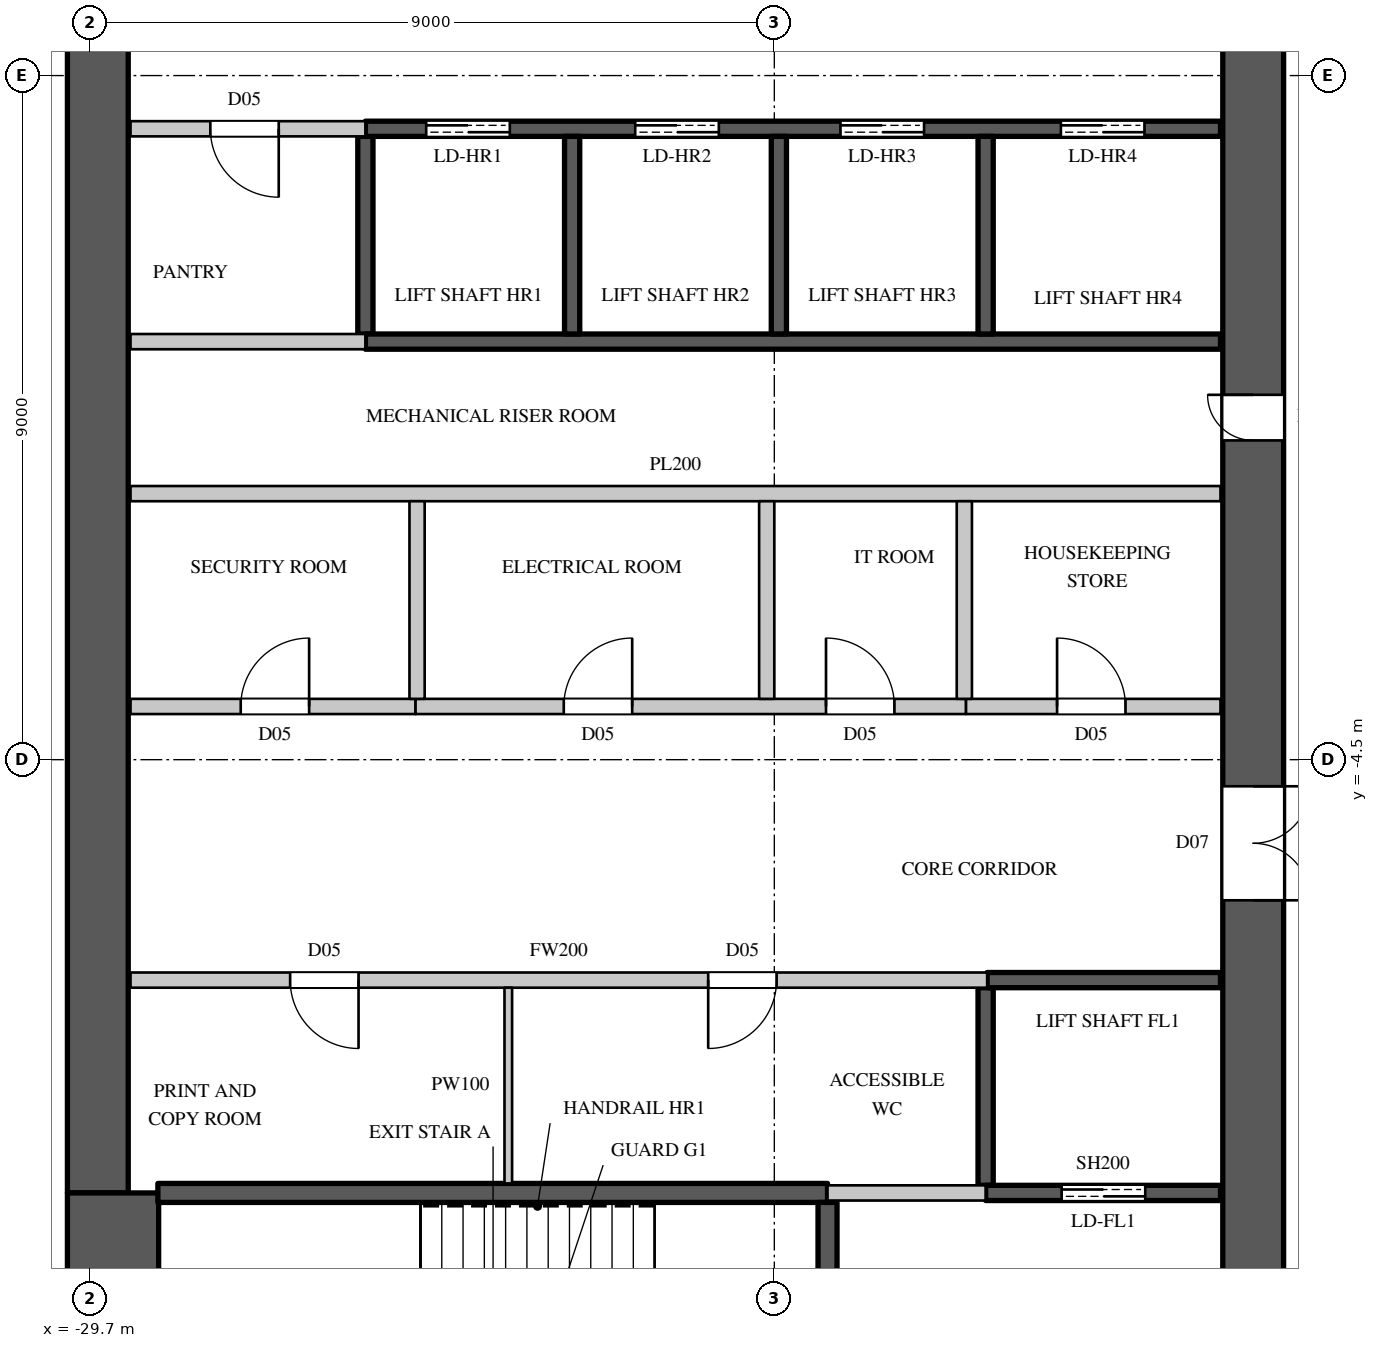
"""IFC4 building model, lengths in metres.
Left out: names, types, materials, properties, quantities, classifications, styles, units other than length and angle.
Written with IfcOpenShell. Run it as: python <this file> out.ifc"""

import sys

from ifc_helpers import new_model, si_unit, direction, frame, frame_2d, origin, place, context, subcontext, project, spatial, rectangle, extrude, element, fill, save


model = new_model("IFC4")
c1 = context("Model", 3, precision=1e-05, world=origin(), true_north=direction((0.0, 1.0)))
c2 = subcontext(c1, "Body", "Model", "MODEL_VIEW")
j1 = project(units=[si_unit("LENGTHUNIT", "METRE"), si_unit("PLANEANGLEUNIT", "RADIAN")], contexts=[c1])
p1 = place(None, origin())
s1 = spatial("IfcSite", under=j1, at=p1, CompositionType="ELEMENT")
p2 = place(p1, origin())
s2 = spatial("IfcBuilding", under=s1, at=p2, CompositionType="ELEMENT")
p3 = place(p2, frame((0.0, 0.0, 230.2)))
s3 = spatial("IfcBuildingStorey", under=s2, at=p3, CompositionType="ELEMENT", Elevation=230.2)
p4 = place(p3, frame((-14.4, -14.8, 0.0), z_axis=(0.0, 0.0, 1.0), x_axis=(0.0, 1.0, 0.0)))
e1 = element("IfcWall", 1, at=p4, inside=s3, PredefinedType="SHEAR", context=c2, shape_type="SweptSolid", body=[
    extrude(rectangle(XDim=29.6, YDim=0.8, at=frame_2d((14.8, 0.0))), origin(), (0.0, 0.0, 1.0), 4.1),
])
p5 = place(p4, frame((1.55, 0.0, 0.0)))
e2 = element("IfcOpeningElement", 2, at=p5, cuts=e1, PredefinedType="OPENING", context=c2, shape_type="SweptSolid", body=[
    extrude(rectangle(XDim=1.5, YDim=2.4, at=frame_2d((0.75, 1.2))), frame((0.0, 0.41, 0.0), z_axis=(0.0, -1.0, 0.0), x_axis=(1.0, 0.0, 0.0)), (0.0, 0.0, 1.0), 0.82),
])
p6 = place(p4, frame((26.55, 0.0, 0.0)))
e3 = element("IfcOpeningElement", 3, at=p6, cuts=e1, PredefinedType="OPENING", context=c2, shape_type="SweptSolid", body=[
    extrude(rectangle(XDim=1.5, YDim=2.4, at=frame_2d((0.75, 1.2))), frame((0.0, 0.41, 0.0), z_axis=(0.0, -1.0, 0.0), x_axis=(1.0, 0.0, 0.0)), (0.0, 0.0, 1.0), 0.82),
])
p7 = place(p4, frame((8.45, 0.0, 0.0)))
e4 = element("IfcOpeningElement", 4, at=p7, cuts=e1, PredefinedType="OPENING", context=c2, shape_type="SweptSolid", body=[
    extrude(rectangle(XDim=1.5, YDim=2.4, at=frame_2d((0.75, 1.2))), frame((0.0, 0.41, 0.0), z_axis=(0.0, -1.0, 0.0), x_axis=(1.0, 0.0, 0.0)), (0.0, 0.0, 1.0), 0.82),
])
p8 = place(p4, frame((19.65, 0.0, 0.0)))
e5 = element("IfcOpeningElement", 5, at=p8, cuts=e1, PredefinedType="OPENING", context=c2, shape_type="SweptSolid", body=[
    extrude(rectangle(XDim=1.5, YDim=2.4, at=frame_2d((0.75, 1.2))), frame((0.0, 0.41, 0.0), z_axis=(0.0, -1.0, 0.0), x_axis=(1.0, 0.0, 0.0)), (0.0, 0.0, 1.0), 0.82),
])
p9 = place(p4, frame((14.5, 0.0, 0.0)))
e6 = element("IfcOpeningElement", 6, at=p9, cuts=e1, PredefinedType="OPENING", context=c2, shape_type="SweptSolid", body=[
    extrude(rectangle(XDim=0.6, YDim=2.0, at=frame_2d((0.3, 1.0))), frame((0.0, 0.41, 0.0), z_axis=(0.0, -1.0, 0.0), x_axis=(1.0, 0.0, 0.0)), (0.0, 0.0, 1.0), 0.82),
])
p10 = place(p3, frame((-29.6, -10.2, 0.0), z_axis=(0.0, 0.0, 1.0), x_axis=(0.0, 1.0, 0.0)))
e7 = element("IfcWall", 7, at=p10, inside=s3, PredefinedType="SHEAR", context=c2, shape_type="SweptSolid", body=[
    extrude(rectangle(XDim=20.4, YDim=0.8, at=frame_2d((10.2, 0.0))), origin(), (0.0, 0.0, 1.0), 4.1),
])
p11 = place(p3, frame((-29.4, -14.8, 0.0), z_axis=(0.0, 0.0, 1.0), x_axis=(0.0, 1.0, 0.0)))
e8 = element("IfcWall", 8, at=p11, inside=s3, PredefinedType="SHEAR", context=c2, shape_type="SweptSolid", body=[
    extrude(rectangle(XDim=4.6, YDim=1.2, at=frame_2d((2.3, 0.0))), origin(), (0.0, 0.0, 1.0), 4.1),
])
p12 = place(p3, frame((-29.17, -7.4, 0.0), z_axis=(0.0, 0.0, 1.0), x_axis=(1.0, 0.0, 0.0)))
e9 = element("IfcWall", 9, at=p12, inside=s3, PredefinedType="PARTITIONING", context=c2, shape_type="SweptSolid", body=[
    extrude(rectangle(XDim=11.27, YDim=0.2, at=frame_2d((5.635, 0.0))), origin(), (0.0, 0.0, 1.0), 3.8),
])
p13 = place(p12, frame((2.1, 0.0, 0.0)))
e10 = element("IfcOpeningElement", 10, at=p13, cuts=e9, PredefinedType="OPENING", context=c2, shape_type="SweptSolid", body=[
    extrude(rectangle(XDim=0.9, YDim=2.2, at=frame_2d((0.45, 1.1))), frame((0.0, 0.11, 0.0), z_axis=(0.0, -1.0, 0.0), x_axis=(1.0, 0.0, 0.0)), (0.0, 0.0, 1.0), 0.22),
])
p14 = place(p12, frame((7.6, 0.0, 0.0)))
e11 = element("IfcOpeningElement", 11, at=p14, cuts=e9, PredefinedType="OPENING", context=c2, shape_type="SweptSolid", body=[
    extrude(rectangle(XDim=0.9, YDim=2.2, at=frame_2d((0.45, 1.1))), frame((0.0, 0.11, 0.0), z_axis=(0.0, -1.0, 0.0), x_axis=(1.0, 0.0, 0.0)), (0.0, 0.0, 1.0), 0.22),
])
p15 = place(p3, frame((-29.17, -3.8, 0.0), z_axis=(0.0, 0.0, 1.0), x_axis=(1.0, 0.0, 0.0)))
e12 = element("IfcWall", 12, at=p15, inside=s3, PredefinedType="PARTITIONING", context=c2, shape_type="SweptSolid", body=[
    extrude(rectangle(XDim=3.75, YDim=0.2, at=frame_2d((1.875, 0.0))), origin(), (0.0, 0.0, 1.0), 3.8),
])
p16 = place(p15, frame((1.45, 0.0, 0.0)))
e13 = element("IfcOpeningElement", 13, at=p16, cuts=e12, PredefinedType="OPENING", context=c2, shape_type="SweptSolid", body=[
    extrude(rectangle(XDim=0.9, YDim=2.2, at=frame_2d((0.45, 1.1))), frame((0.0, 0.11, 0.0), z_axis=(0.0, -1.0, 0.0), x_axis=(1.0, 0.0, 0.0)), (0.0, 0.0, 1.0), 0.22),
])
p17 = place(p3, frame((-29.17, 3.8, 0.0), z_axis=(0.0, 0.0, 1.0), x_axis=(1.0, 0.0, 0.0)))
e14 = element("IfcWall", 14, at=p17, inside=s3, PredefinedType="PARTITIONING", context=c2, shape_type="SweptSolid", body=[
    extrude(rectangle(XDim=3.09, YDim=0.2, at=frame_2d((1.545, 0.0))), origin(), (0.0, 0.0, 1.0), 3.8),
])
p18 = place(p17, frame((1.05, 0.0, 0.0)))
e15 = element("IfcOpeningElement", 15, at=p18, cuts=e14, PredefinedType="OPENING", context=c2, shape_type="SweptSolid", body=[
    extrude(rectangle(XDim=0.9, YDim=2.2, at=frame_2d((0.45, 1.1))), frame((0.0, 0.11, 0.0), z_axis=(0.0, -1.0, 0.0), x_axis=(1.0, 0.0, 0.0)), (0.0, 0.0, 1.0), 0.22),
])
p19 = place(p3, frame((-20.0, -10.2, 0.0), z_axis=(0.0, 0.0, 1.0), x_axis=(1.0, 0.0, 0.0)))
e16 = element("IfcWall", 16, at=p19, inside=s3, PredefinedType="PARTITIONING", context=c2, shape_type="SweptSolid", body=[
    extrude(rectangle(XDim=2.08, YDim=0.2, at=frame_2d((1.04, 0.0))), origin(), (0.0, 0.0, 1.0), 3.8),
])
p20 = place(p3, frame((-18.18, -3.8, 0.0), z_axis=(0.0, 0.0, 1.0), x_axis=(1.0, 0.0, 0.0)))
e17 = element("IfcWall", 17, at=p20, inside=s3, PredefinedType="PARTITIONING", context=c2, shape_type="SweptSolid", body=[
    extrude(rectangle(XDim=3.35, YDim=0.2, at=frame_2d((1.675, 0.0))), origin(), (0.0, 0.0, 1.0), 3.8),
])
p21 = place(p20, frame((1.2, 0.0, 0.0)))
e18 = element("IfcOpeningElement", 18, at=p21, cuts=e17, PredefinedType="OPENING", context=c2, shape_type="SweptSolid", body=[
    extrude(rectangle(XDim=0.9, YDim=2.2, at=frame_2d((0.45, 1.1))), frame((0.0, 0.11, 0.0), z_axis=(0.0, -1.0, 0.0), x_axis=(1.0, 0.0, 0.0)), (0.0, 0.0, 1.0), 0.22),
])
p22 = place(p3, frame((-29.17, -1.0, 0.0), z_axis=(0.0, 0.0, 1.0), x_axis=(1.0, 0.0, 0.0)))
e19 = element("IfcWall", 19, at=p22, inside=s3, PredefinedType="PARTITIONING", context=c2, shape_type="SweptSolid", body=[
    extrude(rectangle(XDim=14.34, YDim=0.2, at=frame_2d((7.17, 0.0))), origin(), (0.0, 0.0, 1.0), 3.8),
])
p23 = place(p3, frame((-29.17, 1.0, 0.0), z_axis=(0.0, 0.0, 1.0), x_axis=(1.0, 0.0, 0.0)))
e20 = element("IfcWall", 20, at=p23, inside=s3, PredefinedType="PARTITIONING", context=c2, shape_type="SweptSolid", body=[
    extrude(rectangle(XDim=3.09, YDim=0.2, at=frame_2d((1.545, 0.0))), origin(), (0.0, 0.0, 1.0), 3.8),
])
p24 = place(p3, frame((-25.42, -3.8, 0.0), z_axis=(0.0, 0.0, 1.0), x_axis=(1.0, 0.0, 0.0)))
e21 = element("IfcWall", 21, at=p24, inside=s3, PredefinedType="PARTITIONING", context=c2, shape_type="SweptSolid", body=[
    extrude(rectangle(XDim=7.24, YDim=0.2, at=frame_2d((3.62, 0.0))), origin(), (0.0, 0.0, 1.0), 3.8),
])
p25 = place(p24, frame((1.95, 0.0, 0.0)))
e22 = element("IfcOpeningElement", 22, at=p25, cuts=e21, PredefinedType="OPENING", context=c2, shape_type="SweptSolid", body=[
    extrude(rectangle(XDim=0.9, YDim=2.2, at=frame_2d((0.45, 1.1))), frame((0.0, 0.11, 0.0), z_axis=(0.0, -1.0, 0.0), x_axis=(1.0, 0.0, 0.0)), (0.0, 0.0, 1.0), 0.22),
])
p26 = place(p24, frame((5.4, 0.0, 0.0)))
e23 = element("IfcOpeningElement", 23, at=p26, cuts=e21, PredefinedType="OPENING", context=c2, shape_type="SweptSolid", body=[
    extrude(rectangle(XDim=0.9, YDim=2.2, at=frame_2d((0.45, 1.1))), frame((0.0, 0.11, 0.0), z_axis=(0.0, -1.0, 0.0), x_axis=(1.0, 0.0, 0.0)), (0.0, 0.0, 1.0), 0.22),
])
for number, where, z_axis, x_axis in (
    (24, (-25.4, -3.7, 0.0), (0.0, 0.0, 1.0), (0.0, 1.0, 0.0)),
    (25, (-20.8, -3.7, 0.0), (0.0, 0.0, 1.0), (0.0, 1.0, 0.0)),
    (26, (-18.2, -3.7, 0.0), (0.0, 0.0, 1.0), (0.0, 1.0, 0.0)),
):
    element("IfcWall", number, at=place(p3, frame(where, z_axis=z_axis, x_axis=x_axis)), inside=s3, PredefinedType="PARTITIONING", context=c2, shape_type="SweptSolid", body=[
        extrude(rectangle(XDim=2.6, YDim=0.2, at=frame_2d((1.3, 0.0))), origin(), (0.0, 0.0, 1.0), 3.8),
    ])
p27 = place(p3, frame((-26.08, 1.1, 0.0), z_axis=(0.0, 0.0, 1.0), x_axis=(0.0, 1.0, 0.0)))
e27 = element("IfcWall", 27, at=p27, inside=s3, PredefinedType="SHEAR", context=c2, shape_type="SweptSolid", body=[
    extrude(rectangle(XDim=2.6, YDim=0.2, at=frame_2d((1.3, 0.0))), origin(), (0.0, 0.0, 1.0), 3.8),
])
p28 = place(p3, frame((-26.08, 1.0, 0.0), z_axis=(0.0, 0.0, 1.0), x_axis=(1.0, 0.0, 0.0)))
e28 = element("IfcWall", 28, at=p28, inside=s3, PredefinedType="SHEAR", context=c2, shape_type="SweptSolid", body=[
    extrude(rectangle(XDim=11.25, YDim=0.2, at=frame_2d((5.625, 0.0))), origin(), (0.0, 0.0, 1.0), 3.8),
])
p29 = place(p3, frame((-26.08, 3.8, 0.0), z_axis=(0.0, 0.0, 1.0), x_axis=(1.0, 0.0, 0.0)))
e29 = element("IfcWall", 29, at=p29, inside=s3, PredefinedType="SHEAR", context=c2, shape_type="SweptSolid", body=[
    extrude(rectangle(XDim=11.25, YDim=0.2, at=frame_2d((5.625, 0.0))), origin(), (0.0, 0.0, 1.0), 3.8),
])
p30 = place(p29, frame((0.8, 0.0, 0.0)))
e30 = element("IfcOpeningElement", 30, at=p30, cuts=e29, PredefinedType="OPENING", context=c2, shape_type="SweptSolid", body=[
    extrude(rectangle(XDim=1.1, YDim=2.2, at=frame_2d((0.55, 1.1))), frame((0.0, 0.11, 0.0), z_axis=(0.0, -1.0, 0.0), x_axis=(1.0, 0.0, 0.0)), (0.0, 0.0, 1.0), 0.22),
])
p31 = place(p29, frame((3.55, 0.0, 0.0)))
e31 = element("IfcOpeningElement", 31, at=p31, cuts=e29, PredefinedType="OPENING", context=c2, shape_type="SweptSolid", body=[
    extrude(rectangle(XDim=1.1, YDim=2.2, at=frame_2d((0.55, 1.1))), frame((0.0, 0.11, 0.0), z_axis=(0.0, -1.0, 0.0), x_axis=(1.0, 0.0, 0.0)), (0.0, 0.0, 1.0), 0.22),
])
p32 = place(p29, frame((6.25, 0.0, 0.0)))
e32 = element("IfcOpeningElement", 32, at=p32, cuts=e29, PredefinedType="OPENING", context=c2, shape_type="SweptSolid", body=[
    extrude(rectangle(XDim=1.1, YDim=2.2, at=frame_2d((0.55, 1.1))), frame((0.0, 0.11, 0.0), z_axis=(0.0, -1.0, 0.0), x_axis=(1.0, 0.0, 0.0)), (0.0, 0.0, 1.0), 0.22),
])
p33 = place(p29, frame((9.15, 0.0, 0.0)))
e33 = element("IfcOpeningElement", 33, at=p33, cuts=e29, PredefinedType="OPENING", context=c2, shape_type="SweptSolid", body=[
    extrude(rectangle(XDim=1.1, YDim=2.2, at=frame_2d((0.55, 1.1))), frame((0.0, 0.11, 0.0), z_axis=(0.0, -1.0, 0.0), x_axis=(1.0, 0.0, 0.0)), (0.0, 0.0, 1.0), 0.22),
])
for number, where, z_axis, x_axis in (
    (34, (-23.36, 1.1, 0.0), (0.0, 0.0, 1.0), (0.0, 1.0, 0.0)),
    (35, (-20.64, 1.1, 0.0), (0.0, 0.0, 1.0), (0.0, 1.0, 0.0)),
):
    element("IfcWall", number, at=place(p3, frame(where, z_axis=z_axis, x_axis=x_axis)), inside=s3, PredefinedType="SHEAR", context=c2, shape_type="SweptSolid", body=[
        extrude(rectangle(XDim=2.6, YDim=0.2, at=frame_2d((1.3, 0.0))), origin(), (0.0, 0.0, 1.0), 4.1),
    ])
p34 = place(p3, frame((-17.92, -10.1, 0.0), z_axis=(0.0, 0.0, 1.0), x_axis=(0.0, 1.0, 0.0)))
e36 = element("IfcWall", 36, at=p34, inside=s3, PredefinedType="SHEAR", context=c2, shape_type="SweptSolid", body=[
    extrude(rectangle(XDim=2.6, YDim=0.2, at=frame_2d((1.3, 0.0))), origin(), (0.0, 0.0, 1.0), 3.8),
])
p35 = place(p3, frame((-17.92, -10.2, 0.0), z_axis=(0.0, 0.0, 1.0), x_axis=(1.0, 0.0, 0.0)))
e37 = element("IfcWall", 37, at=p35, inside=s3, PredefinedType="SHEAR", context=c2, shape_type="SweptSolid", body=[
    extrude(rectangle(XDim=3.09, YDim=0.2, at=frame_2d((1.545, 0.0))), origin(), (0.0, 0.0, 1.0), 3.8),
])
p36 = place(p35, frame((1.0, 0.0, 0.0)))
e38 = element("IfcOpeningElement", 38, at=p36, cuts=e37, PredefinedType="OPENING", context=c2, shape_type="SweptSolid", body=[
    extrude(rectangle(XDim=1.1, YDim=2.2, at=frame_2d((0.55, 1.1))), frame((0.0, 0.11, 0.0), z_axis=(0.0, -1.0, 0.0), x_axis=(1.0, 0.0, 0.0)), (0.0, 0.0, 1.0), 0.22),
])
p37 = place(p3, frame((-17.9, -7.4, 0.0), z_axis=(0.0, 0.0, 1.0), x_axis=(1.0, 0.0, 0.0)))
e39 = element("IfcWall", 39, at=p37, inside=s3, PredefinedType="SHEAR", context=c2, shape_type="SweptSolid", body=[
    extrude(rectangle(XDim=3.07, YDim=0.2, at=frame_2d((1.535, 0.0))), origin(), (0.0, 0.0, 1.0), 3.8),
])
p38 = place(p3, frame((-17.92, 1.1, 0.0), z_axis=(0.0, 0.0, 1.0), x_axis=(0.0, 1.0, 0.0)))
e40 = element("IfcWall", 40, at=p38, inside=s3, PredefinedType="SHEAR", context=c2, shape_type="SweptSolid", body=[
    extrude(rectangle(XDim=2.6, YDim=0.2, at=frame_2d((1.3, 0.0))), origin(), (0.0, 0.0, 1.0), 4.1),
])
p39 = place(p3, frame((-28.81, -10.2, 0.0), z_axis=(0.0, 0.0, 1.0), x_axis=(1.0, 0.0, 0.0)))
e41 = element("IfcWall", 41, at=p39, inside=s3, PredefinedType="SHEAR", context=c2, shape_type="SweptSolid", body=[
    extrude(rectangle(XDim=8.81, YDim=0.25, at=frame_2d((4.405, 0.0))), origin(), (0.0, 0.0, 1.0), 3.8),
])
p40 = place(p3, frame((-20.0, -14.77, 0.0), z_axis=(0.0, 0.0, 1.0), x_axis=(0.0, 1.0, 0.0)))
e42 = element("IfcWall", 42, at=p40, inside=s3, PredefinedType="SHEAR", context=c2, shape_type="SweptSolid", body=[
    extrude(rectangle(XDim=4.445, YDim=0.25, at=frame_2d((2.223, 0.0))), origin(), (0.0, 0.0, 1.0), 3.8),
])
p41 = place(p40, frame((1.7, 0.0, 0.0)))
e43 = element("IfcOpeningElement", 43, at=p41, cuts=e42, PredefinedType="OPENING", context=c2, shape_type="SweptSolid", body=[
    extrude(rectangle(XDim=1.1, YDim=2.2, at=frame_2d((0.55, 1.1))), frame((0.0, 0.135, 0.0), z_axis=(0.0, -1.0, 0.0), x_axis=(1.0, 0.0, 0.0)), (0.0, 0.0, 1.0), 0.27),
])
p42 = place(p3, frame((-24.2, -10.075, 0.0), z_axis=(0.0, 0.0, 1.0), x_axis=(0.0, 1.0, 0.0)))
e44 = element("IfcWall", 44, at=p42, inside=s3, PredefinedType="PARTITIONING", context=c2, shape_type="SweptSolid", body=[
    extrude(rectangle(XDim=2.575, YDim=0.1, at=frame_2d((1.288, 0.0))), origin(), (0.0, 0.0, 1.0), 3.8),
])
p43 = place(p13, origin())
e45 = element("IfcDoor", 45, at=p43, inside=s3, OperationType="SINGLE_SWING_LEFT", PredefinedType="DOOR", context=c2, shape_type="SweptSolid", body=[
    extrude(rectangle(XDim=0.9, YDim=2.2, at=frame_2d((0.45, 1.1))), frame((0.0, 0.025, 0.0), z_axis=(0.0, -1.0, 0.0), x_axis=(1.0, 0.0, 0.0)), (0.0, 0.0, 1.0), 0.05),
])
fill(e10, e45)
p44 = place(p14, origin())
e46 = element("IfcDoor", 46, at=p44, inside=s3, OperationType="SINGLE_SWING_RIGHT", PredefinedType="DOOR", context=c2, shape_type="SweptSolid", body=[
    extrude(rectangle(XDim=0.9, YDim=2.2, at=frame_2d((0.45, 1.1))), frame((0.0, 0.025, 0.0), z_axis=(0.0, -1.0, 0.0), x_axis=(1.0, 0.0, 0.0)), (0.0, 0.0, 1.0), 0.05),
])
fill(e11, e46)
p45 = place(p16, origin())
e47 = element("IfcDoor", 47, at=p45, inside=s3, OperationType="SINGLE_SWING_RIGHT", PredefinedType="DOOR", context=c2, shape_type="SweptSolid", body=[
    extrude(rectangle(XDim=0.9, YDim=2.2, at=frame_2d((0.45, 1.1))), frame((0.0, 0.025, 0.0), z_axis=(0.0, -1.0, 0.0), x_axis=(1.0, 0.0, 0.0)), (0.0, 0.0, 1.0), 0.05),
])
fill(e13, e47)
p46 = place(p25, origin())
e48 = element("IfcDoor", 48, at=p46, inside=s3, OperationType="SINGLE_SWING_RIGHT", PredefinedType="DOOR", context=c2, shape_type="SweptSolid", body=[
    extrude(rectangle(XDim=0.9, YDim=2.2, at=frame_2d((0.45, 1.1))), frame((0.0, 0.025, 0.0), z_axis=(0.0, -1.0, 0.0), x_axis=(1.0, 0.0, 0.0)), (0.0, 0.0, 1.0), 0.05),
])
fill(e22, e48)
p47 = place(p26, origin())
e49 = element("IfcDoor", 49, at=p47, inside=s3, OperationType="SINGLE_SWING_LEFT", PredefinedType="DOOR", context=c2, shape_type="SweptSolid", body=[
    extrude(rectangle(XDim=0.9, YDim=2.2, at=frame_2d((0.45, 1.1))), frame((0.0, 0.025, 0.0), z_axis=(0.0, -1.0, 0.0), x_axis=(1.0, 0.0, 0.0)), (0.0, 0.0, 1.0), 0.05),
])
fill(e23, e49)
p48 = place(p21, origin())
e50 = element("IfcDoor", 50, at=p48, inside=s3, OperationType="SINGLE_SWING_LEFT", PredefinedType="DOOR", context=c2, shape_type="SweptSolid", body=[
    extrude(rectangle(XDim=0.9, YDim=2.2, at=frame_2d((0.45, 1.1))), frame((0.0, 0.025, 0.0), z_axis=(0.0, -1.0, 0.0), x_axis=(1.0, 0.0, 0.0)), (0.0, 0.0, 1.0), 0.05),
])
fill(e18, e50)
p49 = place(p18, origin())
e51 = element("IfcDoor", 51, at=p49, inside=s3, OperationType="SINGLE_SWING_LEFT", PredefinedType="DOOR", context=c2, shape_type="SweptSolid", body=[
    extrude(rectangle(XDim=0.9, YDim=2.2, at=frame_2d((0.45, 1.1))), frame((0.0, 0.025, 0.0), z_axis=(0.0, -1.0, 0.0), x_axis=(1.0, 0.0, 0.0)), (0.0, 0.0, 1.0), 0.05),
])
fill(e15, e51)
p50 = place(p36, origin())
e52 = element("IfcDoor", 52, at=p50, inside=s3, OperationType="DOUBLE_DOOR_SLIDING", PredefinedType="DOOR", context=c2, shape_type="SweptSolid", body=[
    extrude(rectangle(XDim=1.1, YDim=2.2, at=frame_2d((0.55, 1.1))), frame((0.0, 0.025, 0.0), z_axis=(0.0, -1.0, 0.0), x_axis=(1.0, 0.0, 0.0)), (0.0, 0.0, 1.0), 0.05),
])
fill(e38, e52)
p51 = place(p30, origin())
e53 = element("IfcDoor", 53, at=p51, inside=s3, OperationType="DOUBLE_DOOR_SLIDING", PredefinedType="DOOR", context=c2, shape_type="SweptSolid", body=[
    extrude(rectangle(XDim=1.1, YDim=2.2, at=frame_2d((0.55, 1.1))), frame((0.0, 0.025, 0.0), z_axis=(0.0, -1.0, 0.0), x_axis=(1.0, 0.0, 0.0)), (0.0, 0.0, 1.0), 0.05),
])
fill(e30, e53)
p52 = place(p31, origin())
e54 = element("IfcDoor", 54, at=p52, inside=s3, OperationType="DOUBLE_DOOR_SLIDING", PredefinedType="DOOR", context=c2, shape_type="SweptSolid", body=[
    extrude(rectangle(XDim=1.1, YDim=2.2, at=frame_2d((0.55, 1.1))), frame((0.0, 0.025, 0.0), z_axis=(0.0, -1.0, 0.0), x_axis=(1.0, 0.0, 0.0)), (0.0, 0.0, 1.0), 0.05),
])
fill(e31, e54)
p53 = place(p32, origin())
e55 = element("IfcDoor", 55, at=p53, inside=s3, OperationType="DOUBLE_DOOR_SLIDING", PredefinedType="DOOR", context=c2, shape_type="SweptSolid", body=[
    extrude(rectangle(XDim=1.1, YDim=2.2, at=frame_2d((0.55, 1.1))), frame((0.0, 0.025, 0.0), z_axis=(0.0, -1.0, 0.0), x_axis=(1.0, 0.0, 0.0)), (0.0, 0.0, 1.0), 0.05),
])
fill(e32, e55)
p54 = place(p33, origin())
e56 = element("IfcDoor", 56, at=p54, inside=s3, OperationType="DOUBLE_DOOR_SLIDING", PredefinedType="DOOR", context=c2, shape_type="SweptSolid", body=[
    extrude(rectangle(XDim=1.1, YDim=2.2, at=frame_2d((0.55, 1.1))), frame((0.0, 0.025, 0.0), z_axis=(0.0, -1.0, 0.0), x_axis=(1.0, 0.0, 0.0)), (0.0, 0.0, 1.0), 0.05),
])
fill(e33, e56)
p55 = place(p7, origin())
e57 = element("IfcDoor", 57, at=p55, inside=s3, OperationType="DOUBLE_DOOR_SINGLE_SWING", PredefinedType="DOOR", context=c2, shape_type="SweptSolid", body=[
    extrude(rectangle(XDim=1.5, YDim=2.4, at=frame_2d((0.75, 1.2))), frame((0.0, -0.345, 0.0), z_axis=(0.0, -1.0, 0.0), x_axis=(1.0, 0.0, 0.0)), (0.0, 0.0, 1.0), 0.05),
])
fill(e4, e57)
p56 = place(p9, origin())
e58 = element("IfcDoor", 58, at=p56, inside=s3, OperationType="SINGLE_SWING_RIGHT", PredefinedType="DOOR", context=c2, shape_type="SweptSolid", body=[
    extrude(rectangle(XDim=0.6, YDim=2.0, at=frame_2d((0.3, 1.0))), frame((0.0, 0.395, 0.0), z_axis=(0.0, -1.0, 0.0), x_axis=(1.0, 0.0, 0.0)), (0.0, 0.0, 1.0), 0.05),
])
fill(e6, e58)
save(model, sys.argv[1])
